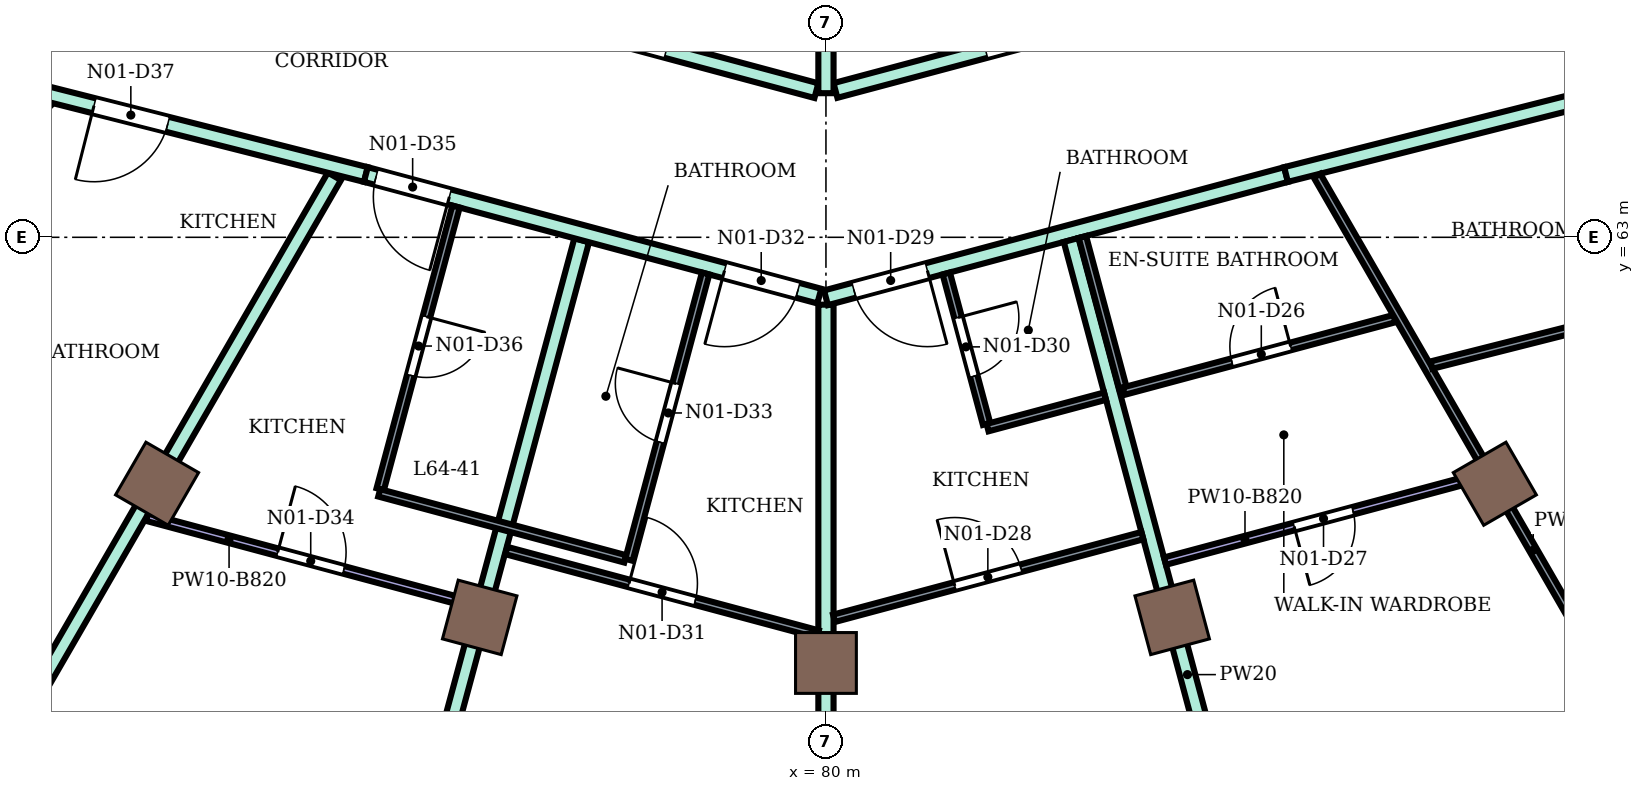
"""IFC4 building model, lengths in metres.
Left out: names, types, materials, properties, quantities, classifications, styles, units other than length and angle.
Written with IfcOpenShell. Run it as: python <this file> out.ifc"""

import sys

from ifc_helpers import new_model, si_unit, direction, frame, frame_2d, origin, origin_2d, place, context, subcontext, project, spatial, rectangle, extrude, element, fill, save


model = new_model("IFC4")
c1 = context("Model", 3, precision=1e-05, world=origin(), true_north=direction((0.0, 1.0)))
c2 = subcontext(c1, "Body", "Model", "MODEL_VIEW")
j1 = project(units=[si_unit("LENGTHUNIT", "METRE"), si_unit("PLANEANGLEUNIT", "RADIAN")], contexts=[c1])
p1 = place(None, origin())
s1 = spatial("IfcSite", under=j1, at=p1, CompositionType="ELEMENT")
p2 = place(p1, origin())
s2 = spatial("IfcBuilding", under=s1, at=p2, CompositionType="ELEMENT")
p3 = place(p2, frame((0.0, 0.0, 279.9)))
s3 = spatial("IfcBuildingStorey", under=s2, at=p3, CompositionType="ELEMENT", Elevation=279.9)
for number, where, z_axis, x_axis in (
    (1, (71.2, 59.758, 0.0), (0.0, 0.0, 1.0), (-0.5, -0.866, 0.0)),
    (2, (75.445, 58.0, 0.0), (0.0, 0.0, 1.0), (-0.259, -0.966, 0.0)),
    (3, (80.0, 57.4, 0.0), (0.0, 0.0, 1.0), (0.0, -1.0, 0.0)),
    (4, (84.555, 58.0, 0.0), (0.0, 0.0, 1.0), (0.259, -0.966, 0.0)),
    (5, (88.8, 59.758, 0.0), (0.0, 0.0, 1.0), (0.5, -0.866, 0.0)),
):
    element("IfcColumn", number, at=place(p3, frame(where, z_axis=z_axis, x_axis=x_axis)), inside=s3, PredefinedType="COLUMN", context=c2, shape_type="SweptSolid", body=[
        extrude(rectangle(XDim=0.8, YDim=0.8, at=origin_2d()), origin(), (0.0, 0.0, 1.0), 4.2),
    ])
p4 = place(p3, frame((67.848, 53.959, 0.0), z_axis=(0.0, 0.0, 1.0), x_axis=(0.500121565392, 0.865955206595, 0.0)))
e6 = element("IfcWall", 6, at=p4, inside=s3, PredefinedType="PARTITIONING", context=c2, shape_type="SweptSolid", body=[
    extrude(rectangle(XDim=11.366, YDim=0.2, at=frame_2d((5.683, 0.0))), origin(), (0.0, 0.0, 1.0), 3.75),
])
p5 = place(p3, frame((68.2, 65.28, 0.0), z_axis=(0.0, 0.0, 1.0), x_axis=(0.969440802773, -0.24532535523, 0.0)))
e7 = element("IfcWall", 7, at=p5, inside=s3, PredefinedType="PARTITIONING", context=c2, shape_type="SweptSolid", body=[
    extrude(rectangle(XDim=5.928, YDim=0.2, at=frame_2d((2.964, 0.0))), origin(), (0.0, 0.0, 1.0), 3.75),
])
p6 = place(p5, frame((2.239, 0.0, 0.0)))
e8 = element("IfcOpeningElement", 8, at=p6, cuts=e7, PredefinedType="OPENING", context=c2, shape_type="SweptSolid", body=[
    extrude(rectangle(XDim=1.0, YDim=2.1, at=frame_2d((0.5, 1.05))), frame((0.0, 0.11, 0.0), z_axis=(0.0, -1.0, 0.0), x_axis=(1.0, 0.0, 0.0)), (0.0, 0.0, 1.0), 0.22),
])
p7 = place(p3, frame((73.702, 51.532, 0.0), z_axis=(0.0, 0.0, 1.0), x_axis=(0.2605791587, 0.965452485652, 0.0)))
e9 = element("IfcWall", 9, at=p7, inside=s3, PredefinedType="PARTITIONING", context=c2, shape_type="SweptSolid", body=[
    extrude(rectangle(XDim=11.838, YDim=0.2, at=frame_2d((5.919, 0.0))), origin(), (0.0, 0.0, 1.0), 3.75),
])
p8 = place(p3, frame((73.947, 63.826, 0.0), z_axis=(0.0, 0.0, 1.0), x_axis=(0.965872508768, -0.25901794688, 0.0)))
e10 = element("IfcWall", 10, at=p8, inside=s3, PredefinedType="PARTITIONING", context=c2, shape_type="SweptSolid", body=[
    extrude(rectangle(XDim=6.177, YDim=0.2, at=frame_2d((3.088, 0.0))), origin(), (0.0, 0.0, 1.0), 3.75),
])
p9 = place(p8, frame((4.885, 0.0, 0.0)))
e11 = element("IfcOpeningElement", 11, at=p9, cuts=e10, PredefinedType="OPENING", context=c2, shape_type="SweptSolid", body=[
    extrude(rectangle(XDim=1.0, YDim=2.1, at=frame_2d((0.5, 1.05))), frame((0.0, 0.11, 0.0), z_axis=(0.0, -1.0, 0.0), x_axis=(1.0, 0.0, 0.0)), (0.0, 0.0, 1.0), 0.22),
])
p10 = place(p8, frame((0.137, 0.0, 0.0)))
e12 = element("IfcOpeningElement", 12, at=p10, cuts=e10, PredefinedType="OPENING", context=c2, shape_type="SweptSolid", body=[
    extrude(rectangle(XDim=1.0, YDim=2.1, at=frame_2d((0.5, 1.05))), frame((0.0, 0.11, 0.0), z_axis=(0.0, -1.0, 0.0), x_axis=(1.0, 0.0, 0.0)), (0.0, 0.0, 1.0), 0.22),
])
p11 = place(p3, frame((74.603, 66.342, 0.0), z_axis=(0.0, 0.0, 1.0), x_axis=(0.965920893652, -0.258837453254, 0.0)))
e13 = element("IfcWall", 13, at=p11, inside=s3, PredefinedType="PARTITIONING", context=c2, shape_type="SweptSolid", body=[
    extrude(rectangle(XDim=5.458, YDim=0.2, at=frame_2d((2.729, 0.0))), origin(), (0.0, 0.0, 1.0), 3.75),
])
p12 = place(p11, frame((2.512, 0.0, 0.0)))
e14 = element("IfcOpeningElement", 14, at=p12, cuts=e13, PredefinedType="OPENING", context=c2, shape_type="SweptSolid", body=[
    extrude(rectangle(XDim=0.9, YDim=2.1, at=frame_2d((0.45, 1.05))), frame((0.0, 0.11, 0.0), z_axis=(0.0, -1.0, 0.0), x_axis=(1.0, 0.0, 0.0)), (0.0, 0.0, 1.0), 0.22),
])
p13 = place(p3, frame((80.125, 64.932, 0.0), z_axis=(0.0, 0.0, 1.0), x_axis=(0.966236955806, 0.257655089674, 0.0)))
e15 = element("IfcWall", 15, at=p13, inside=s3, PredefinedType="PARTITIONING", context=c2, shape_type="SweptSolid", body=[
    extrude(rectangle(XDim=8.039, YDim=0.2, at=frame_2d((4.02, 0.0))), origin(), (0.0, 0.0, 1.0), 3.75),
])
p14 = place(p13, frame((6.298, 0.0, 0.0)))
e16 = element("IfcOpeningElement", 16, at=p14, cuts=e15, PredefinedType="OPENING", context=c2, shape_type="SweptSolid", body=[
    extrude(rectangle(XDim=0.9, YDim=2.1, at=frame_2d((0.45, 1.05))), frame((0.0, 0.11, 0.0), z_axis=(0.0, -1.0, 0.0), x_axis=(1.0, 0.0, 0.0)), (0.0, 0.0, 1.0), 0.22),
])
p15 = place(p13, frame((2.045, 0.0, 0.0)))
e17 = element("IfcOpeningElement", 17, at=p15, cuts=e15, PredefinedType="OPENING", context=c2, shape_type="SweptSolid", body=[
    extrude(rectangle(XDim=0.9, YDim=2.1, at=frame_2d((0.45, 1.05))), frame((0.0, 0.11, 0.0), z_axis=(0.0, -1.0, 0.0), x_axis=(1.0, 0.0, 0.0)), (0.0, 0.0, 1.0), 0.22),
])
p16 = place(p3, frame((80.0, 53.3, 0.0), z_axis=(0.0, 0.0, 1.0), x_axis=(0.0, 1.0, 0.0)))
e18 = element("IfcWall", 18, at=p16, inside=s3, PredefinedType="PARTITIONING", context=c2, shape_type="SweptSolid", body=[
    extrude(rectangle(XDim=8.814, YDim=0.2, at=frame_2d((4.407, 0.0))), origin(), (0.0, 0.0, 1.0), 3.75),
])
p17 = place(p3, frame((80.0, 62.204, 0.0), z_axis=(0.0, 0.0, 1.0), x_axis=(0.965960221635, 0.258690645788, 0.0)))
e19 = element("IfcWall", 19, at=p17, inside=s3, PredefinedType="PARTITIONING", context=c2, shape_type="SweptSolid", body=[
    extrude(rectangle(XDim=6.267, YDim=0.2, at=frame_2d((3.133, 0.0))), origin(), (0.0, 0.0, 1.0), 3.75),
])
p18 = place(p17, frame((0.382, 0.0, 0.0)))
e20 = element("IfcOpeningElement", 20, at=p18, cuts=e19, PredefinedType="OPENING", context=c2, shape_type="SweptSolid", body=[
    extrude(rectangle(XDim=1.0, YDim=2.1, at=frame_2d((0.5, 1.05))), frame((0.0, 0.11, 0.0), z_axis=(0.0, -1.0, 0.0), x_axis=(1.0, 0.0, 0.0)), (0.0, 0.0, 1.0), 0.22),
])
p19 = place(p3, frame((80.0, 64.896, 0.0), z_axis=(0.0, 0.0, 1.0), x_axis=(0.0, 1.0, 0.0)))
e21 = element("IfcWall", 21, at=p19, inside=s3, PredefinedType="PARTITIONING", context=c2, shape_type="SweptSolid", body=[
    extrude(rectangle(XDim=2.405, YDim=0.2, at=frame_2d((1.203, 0.0))), origin(), (0.0, 0.0, 1.0), 3.75),
])
p20 = place(p3, frame((83.225, 62.965, 0.0), z_axis=(0.0, 0.0, 1.0), x_axis=(0.258656021451, -0.965969493601, 0.0)))
e22 = element("IfcWall", 22, at=p20, inside=s3, PredefinedType="PARTITIONING", context=c2, shape_type="SweptSolid", body=[
    extrude(rectangle(XDim=11.838, YDim=0.2, at=frame_2d((5.919, 0.0))), origin(), (0.0, 0.0, 1.0), 3.75),
])
p21 = place(p3, frame((86.053, 63.826, 0.0), z_axis=(0.0, 0.0, 1.0), x_axis=(0.969490004987, 0.245130843083, 0.0)))
e23 = element("IfcWall", 23, at=p21, inside=s3, PredefinedType="PARTITIONING", context=c2, shape_type="SweptSolid", body=[
    extrude(rectangle(XDim=5.908, YDim=0.2, at=frame_2d((2.954, 0.0))), origin(), (0.0, 0.0, 1.0), 3.75),
])
p22 = place(p3, frame((71.068, 59.317, 0.0), z_axis=(0.0, 0.0, 1.0), x_axis=(0.965923173799, -0.258828944127, 0.0)))
e24 = element("IfcWall", 24, at=p22, inside=s3, PredefinedType="PARTITIONING", context=c2, shape_type="SweptSolid", body=[
    extrude(rectangle(XDim=4.468, YDim=0.1, at=frame_2d((2.234, 0.0))), origin(), (0.0, 0.0, 1.0), 3.38),
])
p23 = place(p22, frame((1.779, 0.0, 0.0)))
e25 = element("IfcOpeningElement", 25, at=p23, cuts=e24, PredefinedType="OPENING", context=c2, shape_type="SweptSolid", body=[
    extrude(rectangle(XDim=0.9, YDim=2.1, at=frame_2d((0.45, 1.05))), frame((0.0, 0.06, 0.0), z_axis=(0.0, -1.0, 0.0), x_axis=(1.0, 0.0, 0.0)), (0.0, 0.0, 1.0), 0.12),
])
p24 = place(p3, frame((74.136, 59.686, 0.0), z_axis=(0.0, 0.0, 1.0), x_axis=(0.259020336752, 0.965871867873, 0.0)))
e26 = element("IfcWall", 26, at=p24, inside=s3, PredefinedType="PARTITIONING", context=c2, shape_type="SweptSolid", body=[
    extrude(rectangle(XDim=3.849, YDim=0.1, at=frame_2d((1.925, 0.0))), origin(), (0.0, 0.0, 1.0), 3.75),
])
p25 = place(p24, frame((1.55, 0.0, 0.0)))
e27 = element("IfcOpeningElement", 27, at=p25, cuts=e26, PredefinedType="OPENING", context=c2, shape_type="SweptSolid", body=[
    extrude(rectangle(XDim=0.8, YDim=2.1, at=frame_2d((0.4, 1.05))), frame((0.0, 0.06, 0.0), z_axis=(0.0, -1.0, 0.0), x_axis=(1.0, 0.0, 0.0)), (0.0, 0.0, 1.0), 0.12),
])
p26 = place(p3, frame((74.123, 59.638, 0.0), z_axis=(0.0, 0.0, 1.0), x_axis=(0.965820152698, -0.259213102761, 0.0)))
e28 = element("IfcWall", 28, at=p26, inside=s3, PredefinedType="PARTITIONING", context=c2, shape_type="SweptSolid", body=[
    extrude(rectangle(XDim=3.351, YDim=0.1, at=frame_2d((1.676, 0.0))), origin(), (0.0, 0.0, 1.0), 3.75),
])
p27 = place(p3, frame((75.795, 58.879, 0.0), z_axis=(0.0, 0.0, 1.0), x_axis=(0.965895141847, -0.258933533857, 0.0)))
e29 = element("IfcWall", 29, at=p27, inside=s3, PredefinedType="PARTITIONING", context=c2, shape_type="SweptSolid", body=[
    extrude(rectangle(XDim=4.244, YDim=0.1, at=frame_2d((2.122, 0.0))), origin(), (0.0, 0.0, 1.0), 3.75),
])
p28 = place(p27, frame((1.672, 0.0, 0.0)))
e30 = element("IfcOpeningElement", 30, at=p28, cuts=e29, PredefinedType="OPENING", context=c2, shape_type="SweptSolid", body=[
    extrude(rectangle(XDim=0.9, YDim=2.1, at=frame_2d((0.45, 1.05))), frame((0.0, 0.06, 0.0), z_axis=(0.0, -1.0, 0.0), x_axis=(1.0, 0.0, 0.0)), (0.0, 0.0, 1.0), 0.12),
])
p29 = place(p3, frame((77.408, 58.757, 0.0), z_axis=(0.0, 0.0, 1.0), x_axis=(0.258718354301, 0.965952800683, 0.0)))
e31 = element("IfcWall", 31, at=p29, inside=s3, PredefinedType="PARTITIONING", context=c2, shape_type="SweptSolid", body=[
    extrude(rectangle(XDim=3.9, YDim=0.1, at=frame_2d((1.95, 0.0))), origin(), (0.0, 0.0, 1.0), 3.75),
])
p30 = place(p29, frame((1.6, 0.0, 0.0)))
e32 = element("IfcOpeningElement", 32, at=p30, cuts=e31, PredefinedType="OPENING", context=c2, shape_type="SweptSolid", body=[
    extrude(rectangle(XDim=0.8, YDim=2.1, at=frame_2d((0.4, 1.05))), frame((0.0, 0.06, 0.0), z_axis=(0.0, -1.0, 0.0), x_axis=(1.0, 0.0, 0.0)), (0.0, 0.0, 1.0), 0.12),
])
p31 = place(p3, frame((80.106, 57.988, 0.0), z_axis=(0.0, 0.0, 1.0), x_axis=(0.965893555682, 0.25893945063, 0.0)))
e33 = element("IfcWall", 33, at=p31, inside=s3, PredefinedType="PARTITIONING", context=c2, shape_type="SweptSolid", body=[
    extrude(rectangle(XDim=4.2, YDim=0.1, at=frame_2d((2.1, 0.0))), origin(), (0.0, 0.0, 1.0), 3.75),
])
p32 = place(p31, frame((1.645, 0.0, 0.0)))
e34 = element("IfcOpeningElement", 34, at=p32, cuts=e33, PredefinedType="OPENING", context=c2, shape_type="SweptSolid", body=[
    extrude(rectangle(XDim=0.9, YDim=2.1, at=frame_2d((0.45, 1.05))), frame((0.0, 0.06, 0.0), z_axis=(0.0, -1.0, 0.0), x_axis=(1.0, 0.0, 0.0)), (0.0, 0.0, 1.0), 0.12),
])
p33 = place(p3, frame((81.583, 62.524, 0.0), z_axis=(0.0, 0.0, 1.0), x_axis=(0.258559472989, -0.965995341049, 0.0)))
e35 = element("IfcWall", 35, at=p33, inside=s3, PredefinedType="PARTITIONING", context=c2, shape_type="SweptSolid", body=[
    extrude(rectangle(XDim=2.05, YDim=0.1, at=frame_2d((1.025, 0.0))), origin(), (0.0, 0.0, 1.0), 3.75),
])
p34 = place(p33, frame((0.6, 0.0, 0.0)))
e36 = element("IfcOpeningElement", 36, at=p34, cuts=e35, PredefinedType="OPENING", context=c2, shape_type="SweptSolid", body=[
    extrude(rectangle(XDim=0.8, YDim=2.1, at=frame_2d((0.4, 1.05))), frame((0.0, 0.06, 0.0), z_axis=(0.0, -1.0, 0.0), x_axis=(1.0, 0.0, 0.0)), (0.0, 0.0, 1.0), 0.12),
])
p35 = place(p3, frame((82.126, 60.496, 0.0), z_axis=(0.0, 0.0, 1.0), x_axis=(0.965930342518, 0.258802189717, 0.0)))
e37 = element("IfcWall", 37, at=p35, inside=s3, PredefinedType="PARTITIONING", context=c2, shape_type="SweptSolid", body=[
    extrude(rectangle(XDim=1.6, YDim=0.1, at=frame_2d((0.8, 0.0))), origin(), (0.0, 0.0, 1.0), 3.75),
])
p36 = place(p3, frame((83.374, 63.004, 0.0), z_axis=(0.0, 0.0, 1.0), x_axis=(0.259144823933, -0.965838475227, 0.0)))
e38 = element("IfcWall", 38, at=p36, inside=s3, PredefinedType="PARTITIONING", context=c2, shape_type="SweptSolid", body=[
    extrude(rectangle(XDim=2.05, YDim=0.1, at=frame_2d((1.025, 0.0))), origin(), (0.0, 0.0, 1.0), 3.75),
])
p37 = place(p3, frame((83.918, 60.976, 0.0), z_axis=(0.0, 0.0, 1.0), x_axis=(0.965914351064, 0.258861867428, 0.0)))
e39 = element("IfcWall", 39, at=p37, inside=s3, PredefinedType="PARTITIONING", context=c2, shape_type="SweptSolid", body=[
    extrude(rectangle(XDim=3.687, YDim=0.1, at=frame_2d((1.843, 0.0))), origin(), (0.0, 0.0, 1.0), 3.75),
])
p38 = place(p37, frame((1.473, 0.0, 0.0)))
e40 = element("IfcOpeningElement", 40, at=p38, cuts=e39, PredefinedType="OPENING", context=c2, shape_type="SweptSolid", body=[
    extrude(rectangle(XDim=0.8, YDim=2.1, at=frame_2d((0.4, 1.05))), frame((0.0, 0.06, 0.0), z_axis=(0.0, -1.0, 0.0), x_axis=(1.0, 0.0, 0.0)), (0.0, 0.0, 1.0), 0.12),
])
p39 = place(p3, frame((84.461, 58.74, 0.0), z_axis=(0.0, 0.0, 1.0), x_axis=(0.965893774063, 0.258938636026, 0.0)))
e41 = element("IfcWall", 41, at=p39, inside=s3, PredefinedType="PARTITIONING", context=c2, shape_type="SweptSolid", body=[
    extrude(rectangle(XDim=4.358, YDim=0.1, at=frame_2d((2.179, 0.0))), origin(), (0.0, 0.0, 1.0), 3.38),
])
p40 = place(p39, frame((1.759, 0.0, 0.0)))
e42 = element("IfcOpeningElement", 42, at=p40, cuts=e41, PredefinedType="OPENING", context=c2, shape_type="SweptSolid", body=[
    extrude(rectangle(XDim=0.8, YDim=2.1, at=frame_2d((0.4, 1.05))), frame((0.0, 0.06, 0.0), z_axis=(0.0, -1.0, 0.0), x_axis=(1.0, 0.0, 0.0)), (0.0, 0.0, 1.0), 0.12),
])
p41 = place(p3, frame((86.461, 63.81, 0.0), z_axis=(0.0, 0.0, 1.0), x_axis=(0.499933609462, -0.866063730986, 0.0)))
e43 = element("IfcWall", 43, at=p41, inside=s3, PredefinedType="PARTITIONING", context=c2, shape_type="SweptSolid", body=[
    extrude(rectangle(XDim=11.376, YDim=0.1, at=frame_2d((5.688, 0.0))), origin(), (0.0, 0.0, 1.0), 3.75),
])
p42 = place(p41, frame((7.47, 0.0, 0.0)))
e44 = element("IfcOpeningElement", 44, at=p42, cuts=e43, PredefinedType="OPENING", context=c2, shape_type="SweptSolid", body=[
    extrude(rectangle(XDim=0.9, YDim=2.1, at=frame_2d((0.45, 1.05))), frame((0.0, 0.06, 0.0), z_axis=(0.0, -1.0, 0.0), x_axis=(1.0, 0.0, 0.0)), (0.0, 0.0, 1.0), 0.12),
])
p43 = place(p3, frame((87.966, 61.319, 0.0), z_axis=(0.0, 0.0, 1.0), x_axis=(0.969427184869, 0.245379162189, 0.0)))
e45 = element("IfcWall", 45, at=p43, inside=s3, PredefinedType="PARTITIONING", context=c2, shape_type="SweptSolid", body=[
    extrude(rectangle(XDim=4.625, YDim=0.1, at=frame_2d((2.312, 0.0))), origin(), (0.0, 0.0, 1.0), 3.75),
])
p44 = place(p38, origin())
e46 = element("IfcDoor", 46, at=p44, inside=s3, OperationType="SINGLE_SWING_RIGHT", PredefinedType="DOOR", context=c2, shape_type="SweptSolid", body=[
    extrude(rectangle(XDim=0.8, YDim=2.1, at=frame_2d((0.4, 1.05))), frame((0.0, 0.025, 0.0), z_axis=(0.0, -1.0, 0.0), x_axis=(1.0, 0.0, 0.0)), (0.0, 0.0, 1.0), 0.05),
])
fill(e40, e46)
p45 = place(p40, frame((0.8, 0.0, 0.0), z_axis=(0.0, 0.0, 1.0), x_axis=(-1.0, 0.0, 0.0)))
e47 = element("IfcDoor", 47, at=p45, inside=s3, OperationType="SINGLE_SWING_RIGHT", PredefinedType="DOOR", context=c2, shape_type="SweptSolid", body=[
    extrude(rectangle(XDim=0.8, YDim=2.1, at=frame_2d((0.4, 1.05))), frame((0.0, 0.025, 0.0), z_axis=(0.0, -1.0, 0.0), x_axis=(1.0, 0.0, 0.0)), (0.0, 0.0, 1.0), 0.05),
])
fill(e42, e47)
p46 = place(p32, origin())
e48 = element("IfcDoor", 48, at=p46, inside=s3, OperationType="SINGLE_SWING_LEFT", PredefinedType="DOOR", context=c2, shape_type="SweptSolid", body=[
    extrude(rectangle(XDim=0.9, YDim=2.1, at=frame_2d((0.45, 1.05))), frame((0.0, 0.025, 0.0), z_axis=(0.0, -1.0, 0.0), x_axis=(1.0, 0.0, 0.0)), (0.0, 0.0, 1.0), 0.05),
])
fill(e34, e48)
p47 = place(p18, frame((1.0, 0.0, 0.0), z_axis=(0.0, 0.0, 1.0), x_axis=(-1.0, 0.0, 0.0)))
e49 = element("IfcDoor", 49, at=p47, inside=s3, OperationType="SINGLE_SWING_LEFT", PredefinedType="DOOR", context=c2, shape_type="SweptSolid", body=[
    extrude(rectangle(XDim=1.0, YDim=2.1, at=frame_2d((0.5, 1.05))), frame((0.0, 0.025, 0.0), z_axis=(0.0, -1.0, 0.0), x_axis=(1.0, 0.0, 0.0)), (0.0, 0.0, 1.0), 0.05),
])
fill(e20, e49)
p48 = place(p34, origin())
e50 = element("IfcDoor", 50, at=p48, inside=s3, OperationType="SINGLE_SWING_LEFT", PredefinedType="DOOR", context=c2, shape_type="SweptSolid", body=[
    extrude(rectangle(XDim=0.8, YDim=2.1, at=frame_2d((0.4, 1.05))), frame((0.0, 0.025, 0.0), z_axis=(0.0, -1.0, 0.0), x_axis=(1.0, 0.0, 0.0)), (0.0, 0.0, 1.0), 0.05),
])
fill(e36, e50)
p49 = place(p28, origin())
e51 = element("IfcDoor", 51, at=p49, inside=s3, OperationType="SINGLE_SWING_LEFT", PredefinedType="DOOR", context=c2, shape_type="SweptSolid", body=[
    extrude(rectangle(XDim=0.9, YDim=2.1, at=frame_2d((0.45, 1.05))), frame((0.0, 0.025, 0.0), z_axis=(0.0, -1.0, 0.0), x_axis=(1.0, 0.0, 0.0)), (0.0, 0.0, 1.0), 0.05),
])
fill(e30, e51)
p50 = place(p9, frame((1.0, 0.0, 0.0), z_axis=(0.0, 0.0, 1.0), x_axis=(-1.0, 0.0, 0.0)))
e52 = element("IfcDoor", 52, at=p50, inside=s3, OperationType="SINGLE_SWING_RIGHT", PredefinedType="DOOR", context=c2, shape_type="SweptSolid", body=[
    extrude(rectangle(XDim=1.0, YDim=2.1, at=frame_2d((0.5, 1.05))), frame((0.0, 0.025, 0.0), z_axis=(0.0, -1.0, 0.0), x_axis=(1.0, 0.0, 0.0)), (0.0, 0.0, 1.0), 0.05),
])
fill(e11, e52)
p51 = place(p30, origin())
e53 = element("IfcDoor", 53, at=p51, inside=s3, OperationType="SINGLE_SWING_RIGHT", PredefinedType="DOOR", context=c2, shape_type="SweptSolid", body=[
    extrude(rectangle(XDim=0.8, YDim=2.1, at=frame_2d((0.4, 1.05))), frame((0.0, 0.025, 0.0), z_axis=(0.0, -1.0, 0.0), x_axis=(1.0, 0.0, 0.0)), (0.0, 0.0, 1.0), 0.05),
])
fill(e32, e53)
p52 = place(p23, origin())
e54 = element("IfcDoor", 54, at=p52, inside=s3, OperationType="SINGLE_SWING_LEFT", PredefinedType="DOOR", context=c2, shape_type="SweptSolid", body=[
    extrude(rectangle(XDim=0.9, YDim=2.1, at=frame_2d((0.45, 1.05))), frame((0.0, 0.025, 0.0), z_axis=(0.0, -1.0, 0.0), x_axis=(1.0, 0.0, 0.0)), (0.0, 0.0, 1.0), 0.05),
])
fill(e25, e54)
p53 = place(p10, frame((1.0, 0.0, 0.0), z_axis=(0.0, 0.0, 1.0), x_axis=(-1.0, 0.0, 0.0)))
e55 = element("IfcDoor", 55, at=p53, inside=s3, OperationType="SINGLE_SWING_LEFT", PredefinedType="DOOR", context=c2, shape_type="SweptSolid", body=[
    extrude(rectangle(XDim=1.0, YDim=2.1, at=frame_2d((0.5, 1.05))), frame((0.0, 0.025, 0.0), z_axis=(0.0, -1.0, 0.0), x_axis=(1.0, 0.0, 0.0)), (0.0, 0.0, 1.0), 0.05),
])
fill(e12, e55)
p54 = place(p25, frame((0.8, 0.0, 0.0), z_axis=(0.0, 0.0, 1.0), x_axis=(-1.0, 0.0, 0.0)))
e56 = element("IfcDoor", 56, at=p54, inside=s3, OperationType="SINGLE_SWING_LEFT", PredefinedType="DOOR", context=c2, shape_type="SweptSolid", body=[
    extrude(rectangle(XDim=0.8, YDim=2.1, at=frame_2d((0.4, 1.05))), frame((0.0, 0.025, 0.0), z_axis=(0.0, -1.0, 0.0), x_axis=(1.0, 0.0, 0.0)), (0.0, 0.0, 1.0), 0.05),
])
fill(e27, e56)
p55 = place(p6, frame((1.0, 0.0, 0.0), z_axis=(0.0, 0.0, 1.0), x_axis=(-1.0, 0.0, 0.0)))
e57 = element("IfcDoor", 57, at=p55, inside=s3, OperationType="SINGLE_SWING_RIGHT", PredefinedType="DOOR", context=c2, shape_type="SweptSolid", body=[
    extrude(rectangle(XDim=1.0, YDim=2.1, at=frame_2d((0.5, 1.05))), frame((0.0, 0.025, 0.0), z_axis=(0.0, -1.0, 0.0), x_axis=(1.0, 0.0, 0.0)), (0.0, 0.0, 1.0), 0.05),
])
fill(e8, e57)
save(model, sys.argv[1])
